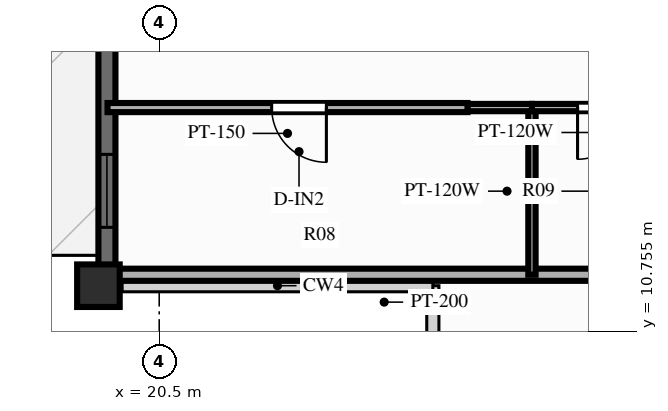
"""IFC4 building model, lengths in metres.
Left out: names, types, materials, properties, quantities, classifications, styles, units other than length and angle.
Written with IfcOpenShell. Run it as: python <this file> out.ifc"""

import sys

from ifc_helpers import new_model, si_unit, direction, frame, frame_2d, origin, origin_2d, place, context, subcontext, project, spatial, rectangle, extrude, source, transform, mapped, element, fill, save


model = new_model("IFC4")
c1 = context("Model", 3, precision=1e-05, world=origin(), true_north=direction((0.0, 1.0)))
c2 = subcontext(c1, "Body", "Model", "MODEL_VIEW")
j1 = project(units=[si_unit("LENGTHUNIT", "METRE"), si_unit("PLANEANGLEUNIT", "RADIAN")], contexts=[c1])
p1 = place(None, origin())
s1 = spatial("IfcSite", under=j1, at=p1, CompositionType="ELEMENT")
p2 = place(p1, origin())
s2 = spatial("IfcBuilding", under=s1, at=p2, CompositionType="ELEMENT")
p3 = place(p2, frame((0.0, 0.0, 216.3)))
s3 = spatial("IfcBuildingStorey", under=s2, at=p3, CompositionType="ELEMENT", Elevation=216.3)
m1 = source(origin(), c2, "Body", "SweptSolid", [
    extrude(rectangle(XDim=0.7, YDim=0.7, at=origin_2d()), origin(), (0.0, 0.0, 1.0), 3.9),
])
p4 = place(p3, frame((19.5, 11.5, 0.0), z_axis=(0.0, 0.0, 1.0), x_axis=(1.0, 0.0, 0.0)))
e1 = element("IfcColumn", 1, at=p4, inside=s3, PredefinedType="COLUMN", context=c2, shape_type="MappedRepresentation", body=[
    mapped(m1, transform((0.0, 0.0, 0.0), scale=1.0)),
])
p5 = place(p3, frame((19.64, 11.5, 0.0), z_axis=(0.0, 0.0, 1.0), x_axis=(0.0, 1.0, 0.0)))
e2 = element("IfcWall", 2, at=p5, inside=s3, PredefinedType="SOLIDWALL", context=c2, shape_type="SweptSolid", body=[
    extrude(rectangle(XDim=31.0, YDim=0.28, at=frame_2d((15.5, 0.0))), origin(), (0.0, 0.0, 1.0), 2.44),
])
p6 = place(p5, frame((0.96, 0.0, 0.25)))
e3 = element("IfcOpeningElement", 3, at=p6, cuts=e2, PredefinedType="OPENING", context=c2, shape_type="SweptSolid", body=[
    extrude(rectangle(XDim=1.2, YDim=1.5, at=frame_2d((0.6, 0.75))), frame((0.0, 0.152, 0.0), z_axis=(0.0, -1.0, 0.0), x_axis=(1.0, 0.0, 0.0)), (0.0, 0.0, 1.0), 0.304),
])
p7 = place(p5, frame((4.02, 0.0, 0.25)))
e4 = element("IfcOpeningElement", 4, at=p7, cuts=e2, PredefinedType="OPENING", context=c2, shape_type="SweptSolid", body=[
    extrude(rectangle(XDim=1.2, YDim=1.5, at=frame_2d((0.6, 0.75))), frame((0.0, 0.152, 0.0), z_axis=(0.0, -1.0, 0.0), x_axis=(1.0, 0.0, 0.0)), (0.0, 0.0, 1.0), 0.304),
])
p8 = place(p5, frame((8.089, 0.0, 0.25)))
e5 = element("IfcOpeningElement", 5, at=p8, cuts=e2, PredefinedType="OPENING", context=c2, shape_type="SweptSolid", body=[
    extrude(rectangle(XDim=1.2, YDim=1.5, at=frame_2d((0.6, 0.75))), frame((0.0, 0.152, 0.0), z_axis=(0.0, -1.0, 0.0), x_axis=(1.0, 0.0, 0.0)), (0.0, 0.0, 1.0), 0.304),
])
p9 = place(p5, frame((11.373, 0.0, 0.25)))
e6 = element("IfcOpeningElement", 6, at=p9, cuts=e2, PredefinedType="OPENING", context=c2, shape_type="SweptSolid", body=[
    extrude(rectangle(XDim=1.2, YDim=1.5, at=frame_2d((0.6, 0.75))), frame((0.0, 0.152, 0.0), z_axis=(0.0, -1.0, 0.0), x_axis=(1.0, 0.0, 0.0)), (0.0, 0.0, 1.0), 0.304),
])
p10 = place(p5, frame((14.307, 0.0, 0.0)))
e7 = element("IfcOpeningElement", 7, at=p10, cuts=e2, PredefinedType="OPENING", context=c2, shape_type="SweptSolid", body=[
    extrude(rectangle(XDim=1.6, YDim=2.15, at=frame_2d((0.8, 1.075))), frame((0.0, 0.152, 0.0), z_axis=(0.0, -1.0, 0.0), x_axis=(1.0, 0.0, 0.0)), (0.0, 0.0, 1.0), 0.304),
])
p11 = place(p5, frame((18.188, 0.0, 0.25)))
e8 = element("IfcOpeningElement", 8, at=p11, cuts=e2, PredefinedType="OPENING", context=c2, shape_type="SweptSolid", body=[
    extrude(rectangle(XDim=1.2, YDim=1.5, at=frame_2d((0.6, 0.75))), frame((0.0, 0.152, 0.0), z_axis=(0.0, -1.0, 0.0), x_axis=(1.0, 0.0, 0.0)), (0.0, 0.0, 1.0), 0.304),
])
p12 = place(p5, frame((21.484, 0.0, 0.25)))
e9 = element("IfcOpeningElement", 9, at=p12, cuts=e2, PredefinedType="OPENING", context=c2, shape_type="SweptSolid", body=[
    extrude(rectangle(XDim=1.2, YDim=1.5, at=frame_2d((0.6, 0.75))), frame((0.0, 0.152, 0.0), z_axis=(0.0, -1.0, 0.0), x_axis=(1.0, 0.0, 0.0)), (0.0, 0.0, 1.0), 0.304),
])
p13 = place(p5, frame((25.234, 0.0, 0.25)))
e10 = element("IfcOpeningElement", 10, at=p13, cuts=e2, PredefinedType="OPENING", context=c2, shape_type="SweptSolid", body=[
    extrude(rectangle(XDim=1.2, YDim=1.5, at=frame_2d((0.6, 0.75))), frame((0.0, 0.152, 0.0), z_axis=(0.0, -1.0, 0.0), x_axis=(1.0, 0.0, 0.0)), (0.0, 0.0, 1.0), 0.304),
])
p14 = place(p5, frame((28.294, 0.0, 0.25)))
e11 = element("IfcOpeningElement", 11, at=p14, cuts=e2, PredefinedType="OPENING", context=c2, shape_type="SweptSolid", body=[
    extrude(rectangle(XDim=1.2, YDim=1.5, at=frame_2d((0.6, 0.75))), frame((0.0, 0.152, 0.0), z_axis=(0.0, -1.0, 0.0), x_axis=(1.0, 0.0, 0.0)), (0.0, 0.0, 1.0), 0.304),
])
p15 = place(p3, frame((28.75, 11.68, 0.0), z_axis=(0.0, 0.0, 1.0), x_axis=(-1.0, 0.0, 0.0)))
e12 = element("IfcWall", 12, at=p15, inside=s3, PredefinedType="PARTITIONING", context=c2, shape_type="SweptSolid", body=[
    extrude(rectangle(XDim=9.1, YDim=0.2, at=frame_2d((4.55, 0.0))), origin(), (0.0, 0.0, 1.0), 2.24),
])
p16 = place(p3, frame((26.63, 11.68, 0.0), z_axis=(0.0, 0.0, 1.0), x_axis=(0.0, 1.0, 0.0)))
e13 = element("IfcWall", 13, at=p16, inside=s3, PredefinedType="PARTITIONING", context=c2, shape_type="SweptSolid", body=[
    extrude(rectangle(XDim=2.75, YDim=0.12, at=frame_2d((1.375, 0.0))), origin(), (0.0, 0.0, 1.0), 2.24),
])
p17 = place(p3, frame((28.75, 14.43, 0.0), z_axis=(0.0, 0.0, 1.0), x_axis=(-1.0, 0.0, 0.0)))
e14 = element("IfcWall", 14, at=p17, inside=s3, PredefinedType="PARTITIONING", context=c2, shape_type="SweptSolid", body=[
    extrude(rectangle(XDim=2.12, YDim=0.12, at=frame_2d((1.06, 0.0))), origin(), (0.0, 0.0, 1.0), 3.56),
])
p18 = place(p17, frame((0.52, 0.0, 0.0)))
e15 = element("IfcOpeningElement", 15, at=p18, cuts=e14, PredefinedType="OPENING", context=c2, shape_type="SweptSolid", body=[
    extrude(rectangle(XDim=0.85, YDim=2.05, at=frame_2d((0.425, 1.025))), frame((0.0, 0.072, 0.0), z_axis=(0.0, -1.0, 0.0), x_axis=(1.0, 0.0, 0.0)), (0.0, 0.0, 1.0), 0.144),
])
p19 = place(p3, frame((26.63, 14.43, 0.0), z_axis=(0.0, 0.0, 1.0), x_axis=(-1.0, 0.0, 0.0)))
e16 = element("IfcWall", 16, at=p19, inside=s3, PredefinedType="PARTITIONING", context=c2, shape_type="SweptSolid", body=[
    extrude(rectangle(XDim=1.06, YDim=0.12, at=frame_2d((0.53, 0.0))), origin(), (0.0, 0.0, 1.0), 3.56),
])
p20 = place(p3, frame((25.57, 14.43, 0.0), z_axis=(0.0, 0.0, 1.0), x_axis=(-1.0, 0.0, 0.0)))
e17 = element("IfcWall", 17, at=p20, inside=s3, PredefinedType="PARTITIONING", context=c2, shape_type="SweptSolid", body=[
    extrude(rectangle(XDim=5.92, YDim=0.15, at=frame_2d((2.96, 0.0))), origin(), (0.0, 0.0, 1.0), 3.56),
])
p21 = place(p20, frame((2.321, 0.0, 0.0)))
e18 = element("IfcOpeningElement", 18, at=p21, cuts=e17, PredefinedType="OPENING", context=c2, shape_type="SweptSolid", body=[
    extrude(rectangle(XDim=0.9, YDim=2.1, at=frame_2d((0.45, 1.05))), frame((0.0, 0.087, 0.0), z_axis=(0.0, -1.0, 0.0), x_axis=(1.0, 0.0, 0.0)), (0.0, 0.0, 1.0), 0.174),
])
m2 = source(origin(), c2, "Body", "SweptSolid", [
    extrude(rectangle(XDim=1.2, YDim=1.5, at=frame_2d((0.6, 0.75))), frame((0.0, 0.03, 0.0), z_axis=(0.0, -1.0, 0.0), x_axis=(1.0, 0.0, 0.0)), (0.0, 0.0, 1.0), 0.06),
])
p22 = place(p6, origin())
e19 = element("IfcWindow", 19, at=p22, inside=s3, PartitioningType="SINGLE_PANEL", PredefinedType="WINDOW", context=c2, shape_type="MappedRepresentation", body=[
    mapped(m2, transform((0.0, 0.0, 0.0), scale=1.0)),
])
fill(e3, e19)
m3 = source(origin(), c2, "Body", "SweptSolid", [
    extrude(rectangle(XDim=0.85, YDim=2.05, at=frame_2d((0.425, 1.025))), frame((0.0, 0.025, 0.0), z_axis=(0.0, -1.0, 0.0), x_axis=(1.0, 0.0, 0.0)), (0.0, 0.0, 1.0), 0.05),
])
p23 = place(p18, origin())
e20 = element("IfcDoor", 20, at=p23, inside=s3, OperationType="SINGLE_SWING_RIGHT", PredefinedType="DOOR", context=c2, shape_type="MappedRepresentation", body=[
    mapped(m3, transform((0.0, 0.0, 0.0), scale=1.0)),
])
fill(e15, e20)
m4 = source(origin(), c2, "Body", "SweptSolid", [
    extrude(rectangle(XDim=0.9, YDim=2.1, at=frame_2d((0.45, 1.05))), frame((0.0, 0.025, 0.0), z_axis=(0.0, -1.0, 0.0), x_axis=(1.0, 0.0, 0.0)), (0.0, 0.0, 1.0), 0.05),
])
p24 = place(p21, origin())
e21 = element("IfcDoor", 21, at=p24, inside=s3, OperationType="SINGLE_SWING_LEFT", PredefinedType="DOOR", context=c2, shape_type="MappedRepresentation", body=[
    mapped(m4, transform((0.0, 0.0, 0.0), scale=1.0)),
])
fill(e18, e21)
save(model, sys.argv[1])
